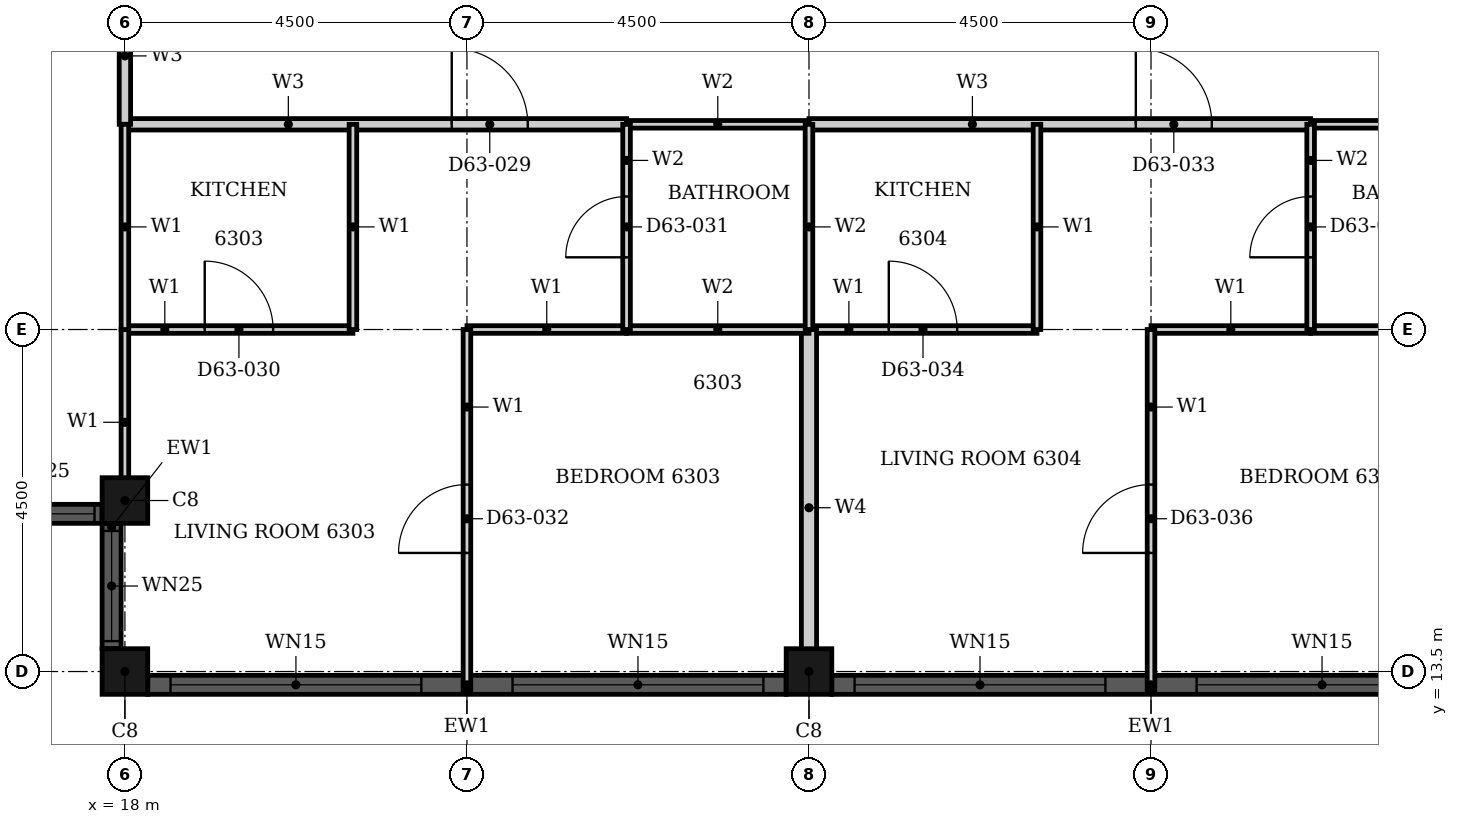
"""IFC4 building model, lengths in metres.
Left out: names, types, materials, properties, quantities, classifications, styles, units other than length and angle.
Written with IfcOpenShell. Run it as: python <this file> out.ifc"""

import sys

from ifc_helpers import new_model, si_unit, direction, frame, frame_2d, origin, origin_2d, place, context, subcontext, project, spatial, rectangle, hollow_rectangle, extrude, element, fill, save


model = new_model("IFC4")
c1 = context("Model", 3, precision=1e-05, world=origin(), true_north=direction((0.0, 1.0)))
c2 = subcontext(c1, "Body", "Model", "MODEL_VIEW")
j1 = project(units=[si_unit("LENGTHUNIT", "METRE"), si_unit("PLANEANGLEUNIT", "RADIAN")], contexts=[c1])
p1 = place(None, origin())
s1 = spatial("IfcSite", under=j1, at=p1, CompositionType="ELEMENT")
p2 = place(p1, origin())
s2 = spatial("IfcBuilding", under=s1, at=p2, CompositionType="ELEMENT")
p3 = place(p2, frame((0.0, 0.0, 249.0)))
s3 = spatial("IfcBuildingStorey", under=s2, at=p3, CompositionType="ELEMENT", Elevation=249.0)
for number, where, z_axis, x_axis in (
    (1, (18.0, 15.75, 0.0), (0.0, 0.0, 1.0), (1.0, 0.0, 0.0)),
    (2, (18.0, 13.5, 0.0), (0.0, 0.0, 1.0), (1.0, 0.0, 0.0)),
    (3, (27.0, 13.5, 0.0), (0.0, 0.0, 1.0), (1.0, 0.0, 0.0)),
):
    element("IfcColumn", number, at=place(p3, frame(where, z_axis=z_axis, x_axis=x_axis)), inside=s3, PredefinedType="COLUMN", context=c2, shape_type="SweptSolid", body=[
        extrude(hollow_rectangle(XDim=0.6, YDim=0.6, WallThickness=0.02, at=origin_2d()), origin(), (0.0, 0.0, 1.0), 3.7),
    ])
p4 = place(p3, frame((16.05, 15.575, 0.0), z_axis=(0.0, 0.0, 1.0), x_axis=(1.0, 0.0, 0.0)))
e4 = element("IfcWall", 4, at=p4, inside=s3, PredefinedType="SOLIDWALL", context=c2, shape_type="SweptSolid", body=[
    extrude(rectangle(XDim=1.65, YDim=0.25, at=frame_2d((0.825, 0.0))), origin(), (0.0, 0.0, 1.0), 3.7),
])
p5 = place(p4, frame((0.1, 0.0, 0.9)))
e5 = element("IfcOpeningElement", 5, at=p5, cuts=e4, PredefinedType="OPENING", context=c2, shape_type="SweptSolid", body=[
    extrude(rectangle(XDim=1.45, YDim=1.85, at=frame_2d((0.725, 0.925))), frame((0.0, 0.135, 0.0), z_axis=(0.0, -1.0, 0.0), x_axis=(1.0, 0.0, 0.0)), (0.0, 0.0, 1.0), 0.27),
])
p6 = place(p3, frame((17.825, 15.45, 0.0), z_axis=(0.0, 0.0, 1.0), x_axis=(0.0, -1.0, 0.0)))
e6 = element("IfcWall", 6, at=p6, inside=s3, PredefinedType="SOLIDWALL", context=c2, shape_type="SweptSolid", body=[
    extrude(rectangle(XDim=1.65, YDim=0.25, at=frame_2d((0.825, 0.0))), origin(), (0.0, 0.0, 1.0), 3.7),
])
p7 = place(p6, frame((0.1, 0.0, 0.9)))
e7 = element("IfcOpeningElement", 7, at=p7, cuts=e6, PredefinedType="OPENING", context=c2, shape_type="SweptSolid", body=[
    extrude(rectangle(XDim=1.45, YDim=1.85, at=frame_2d((0.725, 0.925))), frame((0.0, 0.135, 0.0), z_axis=(0.0, -1.0, 0.0), x_axis=(1.0, 0.0, 0.0)), (0.0, 0.0, 1.0), 0.27),
])
p8 = place(p3, frame((18.3, 13.325, 0.0), z_axis=(0.0, 0.0, 1.0), x_axis=(1.0, 0.0, 0.0)))
e8 = element("IfcWall", 8, at=p8, inside=s3, PredefinedType="SOLIDWALL", context=c2, shape_type="SweptSolid", body=[
    extrude(rectangle(XDim=8.4, YDim=0.25, at=frame_2d((4.2, 0.0))), origin(), (0.0, 0.0, 1.0), 3.7),
])
p9 = place(p8, frame((0.3, 0.0, 0.45)))
e9 = element("IfcOpeningElement", 9, at=p9, cuts=e8, PredefinedType="OPENING", context=c2, shape_type="SweptSolid", body=[
    extrude(rectangle(XDim=3.3, YDim=2.3, at=frame_2d((1.65, 1.15))), frame((0.0, 0.135, 0.0), z_axis=(0.0, -1.0, 0.0), x_axis=(1.0, 0.0, 0.0)), (0.0, 0.0, 1.0), 0.27),
])
p10 = place(p8, frame((4.8, 0.0, 0.45)))
e10 = element("IfcOpeningElement", 10, at=p10, cuts=e8, PredefinedType="OPENING", context=c2, shape_type="SweptSolid", body=[
    extrude(rectangle(XDim=3.3, YDim=2.3, at=frame_2d((1.65, 1.15))), frame((0.0, 0.135, 0.0), z_axis=(0.0, -1.0, 0.0), x_axis=(1.0, 0.0, 0.0)), (0.0, 0.0, 1.0), 0.27),
])
p11 = place(p3, frame((27.3, 13.325, 0.0), z_axis=(0.0, 0.0, 1.0), x_axis=(1.0, 0.0, 0.0)))
e11 = element("IfcWall", 11, at=p11, inside=s3, PredefinedType="SOLIDWALL", context=c2, shape_type="SweptSolid", body=[
    extrude(rectangle(XDim=8.4, YDim=0.25, at=frame_2d((4.2, 0.0))), origin(), (0.0, 0.0, 1.0), 3.7),
])
p12 = place(p11, frame((0.3, 0.0, 0.45)))
e12 = element("IfcOpeningElement", 12, at=p12, cuts=e11, PredefinedType="OPENING", context=c2, shape_type="SweptSolid", body=[
    extrude(rectangle(XDim=3.3, YDim=2.3, at=frame_2d((1.65, 1.15))), frame((0.0, 0.135, 0.0), z_axis=(0.0, -1.0, 0.0), x_axis=(1.0, 0.0, 0.0)), (0.0, 0.0, 1.0), 0.27),
])
p13 = place(p11, frame((4.8, 0.0, 0.45)))
e13 = element("IfcOpeningElement", 13, at=p13, cuts=e11, PredefinedType="OPENING", context=c2, shape_type="SweptSolid", body=[
    extrude(rectangle(XDim=3.3, YDim=2.3, at=frame_2d((1.65, 1.15))), frame((0.0, 0.135, 0.0), z_axis=(0.0, -1.0, 0.0), x_axis=(1.0, 0.0, 0.0)), (0.0, 0.0, 1.0), 0.27),
])
p14 = place(p3, frame((18.0, 20.7, 0.0), z_axis=(0.0, 0.0, 1.0), x_axis=(1.0, 0.0, 0.0)))
e14 = element("IfcWall", 14, at=p14, inside=s3, PredefinedType="PARTITIONING", context=c2, shape_type="SweptSolid", body=[
    extrude(rectangle(XDim=6.6, YDim=0.15, at=frame_2d((3.3, 0.0))), origin(), (0.0, 0.0, 1.0), 3.4),
])
p15 = place(p14, frame((4.3, 0.0, 0.0)))
e15 = element("IfcOpeningElement", 15, at=p15, cuts=e14, PredefinedType="OPENING", context=c2, shape_type="SweptSolid", body=[
    extrude(rectangle(XDim=1.0, YDim=2.2, at=frame_2d((0.5, 1.1))), frame((0.0, 0.085, 0.0), z_axis=(0.0, -1.0, 0.0), x_axis=(1.0, 0.0, 0.0)), (0.0, 0.0, 1.0), 0.17),
])
p16 = place(p3, frame((27.0, 20.7, 0.0), z_axis=(0.0, 0.0, 1.0), x_axis=(1.0, 0.0, 0.0)))
e16 = element("IfcWall", 16, at=p16, inside=s3, PredefinedType="PARTITIONING", context=c2, shape_type="SweptSolid", body=[
    extrude(rectangle(XDim=6.6, YDim=0.15, at=frame_2d((3.3, 0.0))), origin(), (0.0, 0.0, 1.0), 3.4),
])
p17 = place(p16, frame((4.3, 0.0, 0.0)))
e17 = element("IfcOpeningElement", 17, at=p17, cuts=e16, PredefinedType="OPENING", context=c2, shape_type="SweptSolid", body=[
    extrude(rectangle(XDim=1.0, YDim=2.2, at=frame_2d((0.5, 1.1))), frame((0.0, 0.085, 0.0), z_axis=(0.0, -1.0, 0.0), x_axis=(1.0, 0.0, 0.0)), (0.0, 0.0, 1.0), 0.17),
])
p18 = place(p3, frame((18.0, 20.7, 0.0), z_axis=(0.0, 0.0, 1.0), x_axis=(0.0, 1.0, 0.0)))
e18 = element("IfcWall", 18, at=p18, inside=s3, PredefinedType="PARTITIONING", context=c2, shape_type="SweptSolid", body=[
    extrude(rectangle(XDim=1.8, YDim=0.15, at=frame_2d((0.9, 0.0))), origin(), (0.0, 0.0, 1.0), 3.4),
])
p19 = place(p3, frame((22.5, 18.0, 0.0), z_axis=(0.0, 0.0, 1.0), x_axis=(1.0, 0.0, 0.0)))
e19 = element("IfcWall", 19, at=p19, inside=s3, PredefinedType="PARTITIONING", context=c2, shape_type="SweptSolid", body=[
    extrude(rectangle(XDim=2.1, YDim=0.1, at=frame_2d((1.05, 0.0))), origin(), (0.0, 0.0, 1.0), 3.4),
])
p20 = place(p3, frame((18.0, 18.0, 0.0), z_axis=(0.0, 0.0, 1.0), x_axis=(1.0, 0.0, 0.0)))
e20 = element("IfcWall", 20, at=p20, inside=s3, PredefinedType="PARTITIONING", context=c2, shape_type="SweptSolid", body=[
    extrude(rectangle(XDim=3.0, YDim=0.1, at=frame_2d((1.5, 0.0))), origin(), (0.0, 0.0, 1.0), 3.4),
])
p21 = place(p20, frame((1.05, 0.0, 0.0)))
e21 = element("IfcOpeningElement", 21, at=p21, cuts=e20, PredefinedType="OPENING", context=c2, shape_type="SweptSolid", body=[
    extrude(rectangle(XDim=0.9, YDim=2.1, at=frame_2d((0.45, 1.05))), frame((0.0, 0.06, 0.0), z_axis=(0.0, -1.0, 0.0), x_axis=(1.0, 0.0, 0.0)), (0.0, 0.0, 1.0), 0.12),
])
p22 = place(p3, frame((31.5, 18.0, 0.0), z_axis=(0.0, 0.0, 1.0), x_axis=(1.0, 0.0, 0.0)))
e22 = element("IfcWall", 22, at=p22, inside=s3, PredefinedType="PARTITIONING", context=c2, shape_type="SweptSolid", body=[
    extrude(rectangle(XDim=2.1, YDim=0.1, at=frame_2d((1.05, 0.0))), origin(), (0.0, 0.0, 1.0), 3.4),
])
p23 = place(p3, frame((27.0, 18.0, 0.0), z_axis=(0.0, 0.0, 1.0), x_axis=(1.0, 0.0, 0.0)))
e23 = element("IfcWall", 23, at=p23, inside=s3, PredefinedType="PARTITIONING", context=c2, shape_type="SweptSolid", body=[
    extrude(rectangle(XDim=3.0, YDim=0.1, at=frame_2d((1.5, 0.0))), origin(), (0.0, 0.0, 1.0), 3.4),
])
p24 = place(p23, frame((1.05, 0.0, 0.0)))
e24 = element("IfcOpeningElement", 24, at=p24, cuts=e23, PredefinedType="OPENING", context=c2, shape_type="SweptSolid", body=[
    extrude(rectangle(XDim=0.9, YDim=2.1, at=frame_2d((0.45, 1.05))), frame((0.0, 0.06, 0.0), z_axis=(0.0, -1.0, 0.0), x_axis=(1.0, 0.0, 0.0)), (0.0, 0.0, 1.0), 0.12),
])
p25 = place(p3, frame((18.0, 15.56, 0.0), z_axis=(0.0, 0.0, 1.0), x_axis=(0.0, 1.0, 0.0)))
e25 = element("IfcWall", 25, at=p25, inside=s3, PredefinedType="PARTITIONING", context=c2, shape_type="SweptSolid", body=[
    extrude(rectangle(XDim=2.439, YDim=0.1, at=frame_2d((1.219, 0.0))), origin(), (0.0, 0.0, 1.0), 3.4),
])
for number, where, z_axis, x_axis in (
    (26, (18.0, 18.0, 0.0), (0.0, 0.0, 1.0), (0.0, 1.0, 0.0)),
    (27, (21.0, 18.0, 0.0), (0.0, 0.0, 1.0), (0.0, 1.0, 0.0)),
):
    element("IfcWall", number, at=place(p3, frame(where, z_axis=z_axis, x_axis=x_axis)), inside=s3, PredefinedType="PARTITIONING", context=c2, shape_type="SweptSolid", body=[
        extrude(rectangle(XDim=2.7, YDim=0.1, at=frame_2d((1.35, 0.0))), origin(), (0.0, 0.0, 1.0), 3.4),
    ])
p26 = place(p3, frame((22.5, 13.26, 0.0), z_axis=(0.0, 0.0, 1.0), x_axis=(0.0, 1.0, 0.0)))
e28 = element("IfcWall", 28, at=p26, inside=s3, PredefinedType="PARTITIONING", context=c2, shape_type="SweptSolid", body=[
    extrude(rectangle(XDim=4.74, YDim=0.1, at=frame_2d((2.37, 0.0))), origin(), (0.0, 0.0, 1.0), 3.4),
])
p27 = place(p26, frame((1.8, 0.0, 0.0)))
e29 = element("IfcOpeningElement", 29, at=p27, cuts=e28, PredefinedType="OPENING", context=c2, shape_type="SweptSolid", body=[
    extrude(rectangle(XDim=0.9, YDim=2.1, at=frame_2d((0.45, 1.05))), frame((0.0, 0.06, 0.0), z_axis=(0.0, -1.0, 0.0), x_axis=(1.0, 0.0, 0.0)), (0.0, 0.0, 1.0), 0.12),
])
p28 = place(p3, frame((30.0, 18.0, 0.0), z_axis=(0.0, 0.0, 1.0), x_axis=(0.0, 1.0, 0.0)))
e30 = element("IfcWall", 30, at=p28, inside=s3, PredefinedType="PARTITIONING", context=c2, shape_type="SweptSolid", body=[
    extrude(rectangle(XDim=2.7, YDim=0.1, at=frame_2d((1.35, 0.0))), origin(), (0.0, 0.0, 1.0), 3.4),
])
p29 = place(p3, frame((31.5, 13.26, 0.0), z_axis=(0.0, 0.0, 1.0), x_axis=(0.0, 1.0, 0.0)))
e31 = element("IfcWall", 31, at=p29, inside=s3, PredefinedType="PARTITIONING", context=c2, shape_type="SweptSolid", body=[
    extrude(rectangle(XDim=4.74, YDim=0.1, at=frame_2d((2.37, 0.0))), origin(), (0.0, 0.0, 1.0), 3.4),
])
p30 = place(p29, frame((1.8, 0.0, 0.0)))
e32 = element("IfcOpeningElement", 32, at=p30, cuts=e31, PredefinedType="OPENING", context=c2, shape_type="SweptSolid", body=[
    extrude(rectangle(XDim=0.9, YDim=2.1, at=frame_2d((0.45, 1.05))), frame((0.0, 0.06, 0.0), z_axis=(0.0, -1.0, 0.0), x_axis=(1.0, 0.0, 0.0)), (0.0, 0.0, 1.0), 0.12),
])
p31 = place(p3, frame((27.0, 13.31, 0.0), z_axis=(0.0, 0.0, 1.0), x_axis=(0.0, 1.0, 0.0)))
e33 = element("IfcWall", 33, at=p31, inside=s3, PredefinedType="PARTITIONING", context=c2, shape_type="SweptSolid", body=[
    extrude(rectangle(XDim=4.69, YDim=0.2, at=frame_2d((2.345, 0.0))), origin(), (0.0, 0.0, 1.0), 3.4),
])
for number, where, z_axis, x_axis in (
    (34, (24.6, 18.0, 0.0), (0.0, 0.0, 1.0), (1.0, 0.0, 0.0)),
    (35, (33.6, 18.0, 0.0), (0.0, 0.0, 1.0), (1.0, 0.0, 0.0)),
    (36, (24.6, 20.7, 0.0), (0.0, 0.0, 1.0), (1.0, 0.0, 0.0)),
    (37, (33.6, 20.7, 0.0), (0.0, 0.0, 1.0), (1.0, 0.0, 0.0)),
):
    element("IfcWall", number, at=place(p3, frame(where, z_axis=z_axis, x_axis=x_axis)), inside=s3, PredefinedType="PARTITIONING", context=c2, shape_type="SweptSolid", body=[
        extrude(rectangle(XDim=2.4, YDim=0.1, at=frame_2d((1.2, 0.0))), origin(), (0.0, 0.0, 1.0), 3.4),
    ])
p32 = place(p3, frame((24.6, 18.0, 0.0), z_axis=(0.0, 0.0, 1.0), x_axis=(0.0, 1.0, 0.0)))
e38 = element("IfcWall", 38, at=p32, inside=s3, PredefinedType="PARTITIONING", context=c2, shape_type="SweptSolid", body=[
    extrude(rectangle(XDim=2.7, YDim=0.1, at=frame_2d((1.35, 0.0))), origin(), (0.0, 0.0, 1.0), 3.4),
])
p33 = place(p32, frame((0.95, 0.0, 0.0)))
e39 = element("IfcOpeningElement", 39, at=p33, cuts=e38, PredefinedType="OPENING", context=c2, shape_type="SweptSolid", body=[
    extrude(rectangle(XDim=0.8, YDim=2.1, at=frame_2d((0.4, 1.05))), frame((0.0, 0.06, 0.0), z_axis=(0.0, -1.0, 0.0), x_axis=(1.0, 0.0, 0.0)), (0.0, 0.0, 1.0), 0.12),
])
p34 = place(p3, frame((27.0, 18.0, 0.0), z_axis=(0.0, 0.0, 1.0), x_axis=(0.0, 1.0, 0.0)))
e40 = element("IfcWall", 40, at=p34, inside=s3, PredefinedType="PARTITIONING", context=c2, shape_type="SweptSolid", body=[
    extrude(rectangle(XDim=2.7, YDim=0.1, at=frame_2d((1.35, 0.0))), origin(), (0.0, 0.0, 1.0), 3.4),
])
p35 = place(p3, frame((33.6, 18.0, 0.0), z_axis=(0.0, 0.0, 1.0), x_axis=(0.0, 1.0, 0.0)))
e41 = element("IfcWall", 41, at=p35, inside=s3, PredefinedType="PARTITIONING", context=c2, shape_type="SweptSolid", body=[
    extrude(rectangle(XDim=2.7, YDim=0.1, at=frame_2d((1.35, 0.0))), origin(), (0.0, 0.0, 1.0), 3.4),
])
p36 = place(p35, frame((0.95, 0.0, 0.0)))
e42 = element("IfcOpeningElement", 42, at=p36, cuts=e41, PredefinedType="OPENING", context=c2, shape_type="SweptSolid", body=[
    extrude(rectangle(XDim=0.8, YDim=2.1, at=frame_2d((0.4, 1.05))), frame((0.0, 0.06, 0.0), z_axis=(0.0, -1.0, 0.0), x_axis=(1.0, 0.0, 0.0)), (0.0, 0.0, 1.0), 0.12),
])
p37 = place(p5, origin())
e43 = element("IfcWindow", 43, at=p37, inside=s3, PartitioningType="SINGLE_PANEL", PredefinedType="WINDOW", context=c2, shape_type="SweptSolid", body=[
    extrude(rectangle(XDim=1.45, YDim=1.85, at=frame_2d((0.725, 0.925))), frame((0.0, 0.03, 0.0), z_axis=(0.0, -1.0, 0.0), x_axis=(1.0, 0.0, 0.0)), (0.0, 0.0, 1.0), 0.06),
])
fill(e5, e43)
p38 = place(p7, origin())
e44 = element("IfcWindow", 44, at=p38, inside=s3, PartitioningType="SINGLE_PANEL", PredefinedType="WINDOW", context=c2, shape_type="SweptSolid", body=[
    extrude(rectangle(XDim=1.45, YDim=1.85, at=frame_2d((0.725, 0.925))), frame((0.0, 0.03, 0.0), z_axis=(0.0, -1.0, 0.0), x_axis=(1.0, 0.0, 0.0)), (0.0, 0.0, 1.0), 0.06),
])
fill(e7, e44)
p39 = place(p9, origin())
e45 = element("IfcWindow", 45, at=p39, inside=s3, PartitioningType="SINGLE_PANEL", PredefinedType="WINDOW", context=c2, shape_type="SweptSolid", body=[
    extrude(rectangle(XDim=3.3, YDim=2.3, at=frame_2d((1.65, 1.15))), frame((0.0, 0.03, 0.0), z_axis=(0.0, -1.0, 0.0), x_axis=(1.0, 0.0, 0.0)), (0.0, 0.0, 1.0), 0.06),
])
fill(e9, e45)
p40 = place(p10, origin())
e46 = element("IfcWindow", 46, at=p40, inside=s3, PartitioningType="SINGLE_PANEL", PredefinedType="WINDOW", context=c2, shape_type="SweptSolid", body=[
    extrude(rectangle(XDim=3.3, YDim=2.3, at=frame_2d((1.65, 1.15))), frame((0.0, 0.03, 0.0), z_axis=(0.0, -1.0, 0.0), x_axis=(1.0, 0.0, 0.0)), (0.0, 0.0, 1.0), 0.06),
])
fill(e10, e46)
p41 = place(p12, origin())
e47 = element("IfcWindow", 47, at=p41, inside=s3, PartitioningType="SINGLE_PANEL", PredefinedType="WINDOW", context=c2, shape_type="SweptSolid", body=[
    extrude(rectangle(XDim=3.3, YDim=2.3, at=frame_2d((1.65, 1.15))), frame((0.0, 0.03, 0.0), z_axis=(0.0, -1.0, 0.0), x_axis=(1.0, 0.0, 0.0)), (0.0, 0.0, 1.0), 0.06),
])
fill(e12, e47)
p42 = place(p13, origin())
e48 = element("IfcWindow", 48, at=p42, inside=s3, PartitioningType="SINGLE_PANEL", PredefinedType="WINDOW", context=c2, shape_type="SweptSolid", body=[
    extrude(rectangle(XDim=3.3, YDim=2.3, at=frame_2d((1.65, 1.15))), frame((0.0, 0.03, 0.0), z_axis=(0.0, -1.0, 0.0), x_axis=(1.0, 0.0, 0.0)), (0.0, 0.0, 1.0), 0.06),
])
fill(e13, e48)
p43 = place(p15, origin())
e49 = element("IfcDoor", 49, at=p43, inside=s3, OperationType="SINGLE_SWING_LEFT", PredefinedType="DOOR", context=c2, shape_type="SweptSolid", body=[
    extrude(rectangle(XDim=1.0, YDim=2.2, at=frame_2d((0.5, 1.1))), frame((0.0, 0.025, 0.0), z_axis=(0.0, -1.0, 0.0), x_axis=(1.0, 0.0, 0.0)), (0.0, 0.0, 1.0), 0.05),
])
fill(e15, e49)
p44 = place(p21, origin())
e50 = element("IfcDoor", 50, at=p44, inside=s3, OperationType="SINGLE_SWING_RIGHT", PredefinedType="DOOR", context=c2, shape_type="SweptSolid", body=[
    extrude(rectangle(XDim=0.9, YDim=2.1, at=frame_2d((0.45, 1.05))), frame((0.0, 0.025, 0.0), z_axis=(0.0, -1.0, 0.0), x_axis=(1.0, 0.0, 0.0)), (0.0, 0.0, 1.0), 0.05),
])
fill(e21, e50)
p45 = place(p33, origin())
e51 = element("IfcDoor", 51, at=p45, inside=s3, OperationType="SINGLE_SWING_RIGHT", PredefinedType="DOOR", context=c2, shape_type="SweptSolid", body=[
    extrude(rectangle(XDim=0.8, YDim=2.1, at=frame_2d((0.4, 1.05))), frame((0.0, 0.025, 0.0), z_axis=(0.0, -1.0, 0.0), x_axis=(1.0, 0.0, 0.0)), (0.0, 0.0, 1.0), 0.05),
])
fill(e39, e51)
p46 = place(p27, origin())
e52 = element("IfcDoor", 52, at=p46, inside=s3, OperationType="SINGLE_SWING_RIGHT", PredefinedType="DOOR", context=c2, shape_type="SweptSolid", body=[
    extrude(rectangle(XDim=0.9, YDim=2.1, at=frame_2d((0.45, 1.05))), frame((0.0, 0.025, 0.0), z_axis=(0.0, -1.0, 0.0), x_axis=(1.0, 0.0, 0.0)), (0.0, 0.0, 1.0), 0.05),
])
fill(e29, e52)
p47 = place(p17, origin())
e53 = element("IfcDoor", 53, at=p47, inside=s3, OperationType="SINGLE_SWING_LEFT", PredefinedType="DOOR", context=c2, shape_type="SweptSolid", body=[
    extrude(rectangle(XDim=1.0, YDim=2.2, at=frame_2d((0.5, 1.1))), frame((0.0, 0.025, 0.0), z_axis=(0.0, -1.0, 0.0), x_axis=(1.0, 0.0, 0.0)), (0.0, 0.0, 1.0), 0.05),
])
fill(e17, e53)
p48 = place(p24, origin())
e54 = element("IfcDoor", 54, at=p48, inside=s3, OperationType="SINGLE_SWING_LEFT", PredefinedType="DOOR", context=c2, shape_type="SweptSolid", body=[
    extrude(rectangle(XDim=0.9, YDim=2.1, at=frame_2d((0.45, 1.05))), frame((0.0, 0.025, 0.0), z_axis=(0.0, -1.0, 0.0), x_axis=(1.0, 0.0, 0.0)), (0.0, 0.0, 1.0), 0.05),
])
fill(e24, e54)
p49 = place(p36, origin())
e55 = element("IfcDoor", 55, at=p49, inside=s3, OperationType="SINGLE_SWING_RIGHT", PredefinedType="DOOR", context=c2, shape_type="SweptSolid", body=[
    extrude(rectangle(XDim=0.8, YDim=2.1, at=frame_2d((0.4, 1.05))), frame((0.0, 0.025, 0.0), z_axis=(0.0, -1.0, 0.0), x_axis=(1.0, 0.0, 0.0)), (0.0, 0.0, 1.0), 0.05),
])
fill(e42, e55)
p50 = place(p30, origin())
e56 = element("IfcDoor", 56, at=p50, inside=s3, OperationType="SINGLE_SWING_LEFT", PredefinedType="DOOR", context=c2, shape_type="SweptSolid", body=[
    extrude(rectangle(XDim=0.9, YDim=2.1, at=frame_2d((0.45, 1.05))), frame((0.0, 0.025, 0.0), z_axis=(0.0, -1.0, 0.0), x_axis=(1.0, 0.0, 0.0)), (0.0, 0.0, 1.0), 0.05),
])
fill(e32, e56)
save(model, sys.argv[1])
